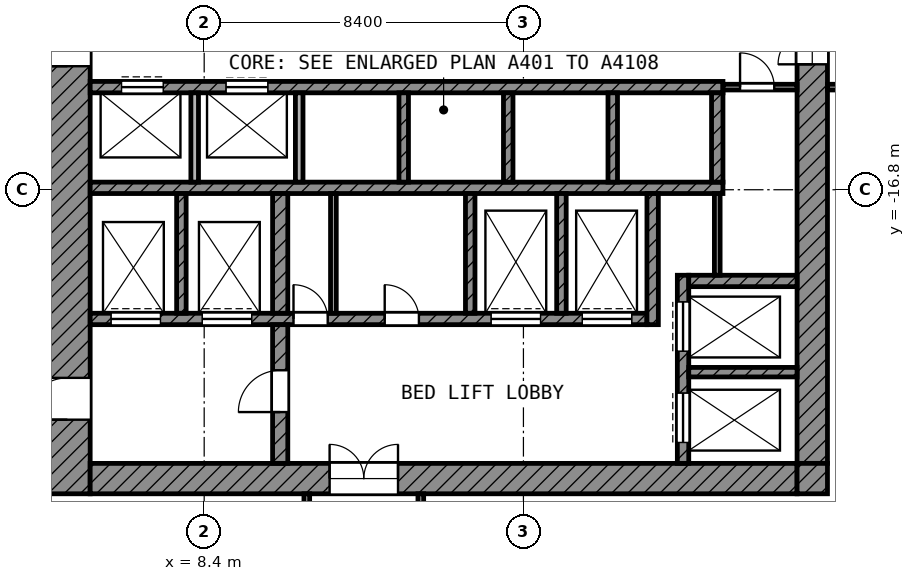
"""IFC4 building model, lengths in metres.
Left out: names, types, materials, properties, quantities, classifications, styles, units other than length and angle.
Written with IfcOpenShell. Run it as: python <this file> out.ifc"""

import sys

from ifc_helpers import new_model, si_unit, direction, frame, frame_2d, origin, place, context, subcontext, project, spatial, rectangle, extrude, element, fill, save


model = new_model("IFC4")
c1 = context("Model", 3, precision=1e-05, world=origin(), true_north=direction((0.0, 1.0)))
c2 = subcontext(c1, "Body", "Model", "MODEL_VIEW")
j1 = project(units=[si_unit("LENGTHUNIT", "METRE"), si_unit("PLANEANGLEUNIT", "RADIAN")], contexts=[c1])
p1 = place(None, origin())
s1 = spatial("IfcSite", under=j1, at=p1, CompositionType="ELEMENT")
p2 = place(p1, origin())
s2 = spatial("IfcBuilding", under=s1, at=p2, CompositionType="ELEMENT")
p3 = place(p2, frame((0.0, 0.0, 255.8)))
s3 = spatial("IfcBuildingStorey", under=s2, at=p3, CompositionType="ELEMENT", Elevation=255.8)
p4 = place(p3, frame((4.8, -24.8, 0.0), z_axis=(0.0, 0.0, 1.0), x_axis=(0.0, 1.0, 0.0)))
e1 = element("IfcWall", 1, at=p4, inside=s3, PredefinedType="SHEAR", context=c2, shape_type="SweptSolid", body=[
    extrude(rectangle(XDim=19.4, YDim=1.2, at=frame_2d((9.7, 0.0))), origin(), (0.0, 0.0, 1.0), 3.6),
])
p5 = place(p4, frame((11.25, 0.0, 0.0)))
e2 = element("IfcOpeningElement", 2, at=p5, cuts=e1, PredefinedType="OPENING", context=c2, shape_type="SweptSolid", body=[
    extrude(rectangle(XDim=1.1, YDim=2.1, at=frame_2d((0.55, 1.05))), frame((0.0, 0.61, 0.0), z_axis=(0.0, -1.0, 0.0), x_axis=(1.0, 0.0, 0.0)), (0.0, 0.0, 1.0), 1.22),
])
p6 = place(p4, frame((1.95, 0.0, 0.0)))
e3 = element("IfcOpeningElement", 3, at=p6, cuts=e1, PredefinedType="OPENING", context=c2, shape_type="SweptSolid", body=[
    extrude(rectangle(XDim=1.1, YDim=2.1, at=frame_2d((0.55, 1.05))), frame((0.0, 0.61, 0.0), z_axis=(0.0, -1.0, 0.0), x_axis=(1.0, 0.0, 0.0)), (0.0, 0.0, 1.0), 1.22),
])
p7 = place(p3, frame((24.4, -24.0, 0.0), z_axis=(0.0, 0.0, 1.0), x_axis=(0.0, 1.0, 0.0)))
e4 = element("IfcWall", 4, at=p7, inside=s3, PredefinedType="SHEAR", context=c2, shape_type="SweptSolid", body=[
    extrude(rectangle(XDim=18.6, YDim=0.8, at=frame_2d((9.3, 0.0))), origin(), (0.0, 0.0, 1.0), 3.6),
])
p8 = place(p7, frame((10.5, 0.0, 0.0)))
e5 = element("IfcOpeningElement", 5, at=p8, cuts=e4, PredefinedType="OPENING", context=c2, shape_type="SweptSolid", body=[
    extrude(rectangle(XDim=1.8, YDim=2.1, at=frame_2d((0.9, 1.05))), frame((0.0, 0.41, 0.0), z_axis=(0.0, -1.0, 0.0), x_axis=(1.0, 0.0, 0.0)), (0.0, 0.0, 1.0), 0.82),
])
p9 = place(p3, frame((5.4, -24.4, 0.0), z_axis=(0.0, 0.0, 1.0), x_axis=(1.0, 0.0, 0.0)))
e6 = element("IfcWall", 6, at=p9, inside=s3, PredefinedType="SHEAR", context=c2, shape_type="SweptSolid", body=[
    extrude(rectangle(XDim=18.6, YDim=0.8, at=frame_2d((9.3, 0.0))), origin(), (0.0, 0.0, 1.0), 3.6),
])
p10 = place(p9, frame((6.3, 0.0, 0.0)))
e7 = element("IfcOpeningElement", 7, at=p10, cuts=e6, PredefinedType="OPENING", context=c2, shape_type="SweptSolid", body=[
    extrude(rectangle(XDim=1.8, YDim=2.1, at=frame_2d((0.9, 1.05))), frame((0.0, 0.41, 0.0), z_axis=(0.0, -1.0, 0.0), x_axis=(1.0, 0.0, 0.0)), (0.0, 0.0, 1.0), 0.82),
])
p11 = place(p3, frame((24.4, -24.8, 0.0), z_axis=(0.0, 0.0, 1.0), x_axis=(0.0, 1.0, 0.0)))
e8 = element("IfcWall", 8, at=p11, inside=s3, PredefinedType="SHEAR", context=c2, shape_type="SweptSolid", body=[
    extrude(rectangle(XDim=0.8, YDim=0.8, at=frame_2d((0.4, 0.0))), origin(), (0.0, 0.0, 1.0), 3.6),
])
p12 = place(p3, frame((5.4, -14.1, 0.0), z_axis=(0.0, 0.0, 1.0), x_axis=(1.0, 0.0, 0.0)))
e9 = element("IfcWall", 9, at=p12, inside=s3, PredefinedType="SHEAR", context=c2, shape_type="SweptSolid", body=[
    extrude(rectangle(XDim=16.65, YDim=0.3, at=frame_2d((8.325, 0.0))), origin(), (0.0, 0.0, 1.0), 3.6),
])
p13 = place(p12, frame((0.825, 0.0, 0.0)))
e10 = element("IfcOpeningElement", 10, at=p13, cuts=e9, PredefinedType="OPENING", context=c2, shape_type="SweptSolid", body=[
    extrude(rectangle(XDim=1.1, YDim=2.1, at=frame_2d((0.55, 1.05))), frame((0.0, 0.16, 0.0), z_axis=(0.0, -1.0, 0.0), x_axis=(1.0, 0.0, 0.0)), (0.0, 0.0, 1.0), 0.32),
])
p14 = place(p12, frame((3.575, 0.0, 0.0)))
e11 = element("IfcOpeningElement", 11, at=p14, cuts=e9, PredefinedType="OPENING", context=c2, shape_type="SweptSolid", body=[
    extrude(rectangle(XDim=1.1, YDim=2.1, at=frame_2d((0.55, 1.05))), frame((0.0, 0.16, 0.0), z_axis=(0.0, -1.0, 0.0), x_axis=(1.0, 0.0, 0.0)), (0.0, 0.0, 1.0), 0.32),
])
p15 = place(p3, frame((5.4, -16.75, 0.0), z_axis=(0.0, 0.0, 1.0), x_axis=(1.0, 0.0, 0.0)))
e12 = element("IfcWall", 12, at=p15, inside=s3, PredefinedType="SHEAR", context=c2, shape_type="SweptSolid", body=[
    extrude(rectangle(XDim=16.65, YDim=0.3, at=frame_2d((8.325, 0.0))), origin(), (0.0, 0.0, 1.0), 3.6),
])
p16 = place(p3, frame((5.4, -20.2, 0.0), z_axis=(0.0, 0.0, 1.0), x_axis=(1.0, 0.0, 0.0)))
e13 = element("IfcWall", 13, at=p16, inside=s3, PredefinedType="SHEAR", context=c2, shape_type="SweptSolid", body=[
    extrude(rectangle(XDim=14.65, YDim=0.3, at=frame_2d((7.325, 0.0))), origin(), (0.0, 0.0, 1.0), 3.6),
])
p17 = place(p16, frame((10.55, 0.0, 0.0)))
e14 = element("IfcOpeningElement", 14, at=p17, cuts=e13, PredefinedType="OPENING", context=c2, shape_type="SweptSolid", body=[
    extrude(rectangle(XDim=1.3, YDim=2.1, at=frame_2d((0.65, 1.05))), frame((0.0, 0.16, 0.0), z_axis=(0.0, -1.0, 0.0), x_axis=(1.0, 0.0, 0.0)), (0.0, 0.0, 1.0), 0.32),
])
p18 = place(p16, frame((12.95, 0.0, 0.0)))
e15 = element("IfcOpeningElement", 15, at=p18, cuts=e13, PredefinedType="OPENING", context=c2, shape_type="SweptSolid", body=[
    extrude(rectangle(XDim=1.3, YDim=2.1, at=frame_2d((0.65, 1.05))), frame((0.0, 0.16, 0.0), z_axis=(0.0, -1.0, 0.0), x_axis=(1.0, 0.0, 0.0)), (0.0, 0.0, 1.0), 0.32),
])
p19 = place(p16, frame((0.55, 0.0, 0.0)))
e16 = element("IfcOpeningElement", 16, at=p19, cuts=e13, PredefinedType="OPENING", context=c2, shape_type="SweptSolid", body=[
    extrude(rectangle(XDim=1.3, YDim=2.1, at=frame_2d((0.65, 1.05))), frame((0.0, 0.16, 0.0), z_axis=(0.0, -1.0, 0.0), x_axis=(1.0, 0.0, 0.0)), (0.0, 0.0, 1.0), 0.32),
])
p20 = place(p16, frame((2.95, 0.0, 0.0)))
e17 = element("IfcOpeningElement", 17, at=p20, cuts=e13, PredefinedType="OPENING", context=c2, shape_type="SweptSolid", body=[
    extrude(rectangle(XDim=1.3, YDim=2.1, at=frame_2d((0.65, 1.05))), frame((0.0, 0.16, 0.0), z_axis=(0.0, -1.0, 0.0), x_axis=(1.0, 0.0, 0.0)), (0.0, 0.0, 1.0), 0.32),
])
p21 = place(p16, frame((5.35, 0.0, 0.0)))
e18 = element("IfcOpeningElement", 18, at=p21, cuts=e13, PredefinedType="OPENING", context=c2, shape_type="SweptSolid", body=[
    extrude(rectangle(XDim=0.9, YDim=2.1, at=frame_2d((0.45, 1.05))), frame((0.0, 0.16, 0.0), z_axis=(0.0, -1.0, 0.0), x_axis=(1.0, 0.0, 0.0)), (0.0, 0.0, 1.0), 0.32),
])
p22 = place(p16, frame((7.75, 0.0, 0.0)))
e19 = element("IfcOpeningElement", 19, at=p22, cuts=e13, PredefinedType="OPENING", context=c2, shape_type="SweptSolid", body=[
    extrude(rectangle(XDim=0.9, YDim=2.1, at=frame_2d((0.45, 1.05))), frame((0.0, 0.16, 0.0), z_axis=(0.0, -1.0, 0.0), x_axis=(1.0, 0.0, 0.0)), (0.0, 0.0, 1.0), 0.32),
])
p23 = place(p3, frame((10.4, -24.0, 0.0), z_axis=(0.0, 0.0, 1.0), x_axis=(0.0, 1.0, 0.0)))
e20 = element("IfcWall", 20, at=p23, inside=s3, PredefinedType="SHEAR", context=c2, shape_type="SweptSolid", body=[
    extrude(rectangle(XDim=3.65, YDim=0.4, at=frame_2d((1.825, 0.0))), origin(), (0.0, 0.0, 1.0), 3.6),
])
p24 = place(p23, frame((1.35, 0.0, 0.0)))
e21 = element("IfcOpeningElement", 21, at=p24, cuts=e20, PredefinedType="OPENING", context=c2, shape_type="SweptSolid", body=[
    extrude(rectangle(XDim=1.1, YDim=2.1, at=frame_2d((0.55, 1.05))), frame((0.0, 0.21, 0.0), z_axis=(0.0, -1.0, 0.0), x_axis=(1.0, 0.0, 0.0)), (0.0, 0.0, 1.0), 0.42),
])
p25 = place(p3, frame((10.4, -20.05, 0.0), z_axis=(0.0, 0.0, 1.0), x_axis=(0.0, 1.0, 0.0)))
e22 = element("IfcWall", 22, at=p25, inside=s3, PredefinedType="SHEAR", context=c2, shape_type="SweptSolid", body=[
    extrude(rectangle(XDim=3.15, YDim=0.4, at=frame_2d((1.575, 0.0))), origin(), (0.0, 0.0, 1.0), 3.6),
])
p26 = place(p3, frame((20.2, -20.35, 0.0), z_axis=(0.0, 0.0, 1.0), x_axis=(0.0, 1.0, 0.0)))
e23 = element("IfcWall", 23, at=p26, inside=s3, PredefinedType="SHEAR", context=c2, shape_type="SweptSolid", body=[
    extrude(rectangle(XDim=3.45, YDim=0.3, at=frame_2d((1.725, 0.0))), origin(), (0.0, 0.0, 1.0), 3.6),
])
p27 = place(p3, frame((21.9, -16.6, 0.0), z_axis=(0.0, 0.0, 1.0), x_axis=(0.0, 1.0, 0.0)))
e24 = element("IfcWall", 24, at=p27, inside=s3, PredefinedType="SHEAR", context=c2, shape_type="SweptSolid", body=[
    extrude(rectangle(XDim=2.35, YDim=0.3, at=frame_2d((1.175, 0.0))), origin(), (0.0, 0.0, 1.0), 3.6),
])
p28 = place(p3, frame((21.15, -19.2, 0.0), z_axis=(0.0, 0.0, 1.0), x_axis=(1.0, 0.0, 0.0)))
e25 = element("IfcWall", 25, at=p28, inside=s3, PredefinedType="SHEAR", context=c2, shape_type="SweptSolid", body=[
    extrude(rectangle(XDim=2.85, YDim=0.3, at=frame_2d((1.425, 0.0))), origin(), (0.0, 0.0, 1.0), 3.6),
])
p29 = place(p3, frame((21.0, -24.0, 0.0), z_axis=(0.0, 0.0, 1.0), x_axis=(0.0, 1.0, 0.0)))
e26 = element("IfcWall", 26, at=p29, inside=s3, PredefinedType="SHEAR", context=c2, shape_type="SweptSolid", body=[
    extrude(rectangle(XDim=4.95, YDim=0.3, at=frame_2d((2.475, 0.0))), origin(), (0.0, 0.0, 1.0), 3.6),
])
p30 = place(p29, frame((2.95, 0.0, 0.0)))
e27 = element("IfcOpeningElement", 27, at=p30, cuts=e26, PredefinedType="OPENING", context=c2, shape_type="SweptSolid", body=[
    extrude(rectangle(XDim=1.3, YDim=2.1, at=frame_2d((0.65, 1.05))), frame((0.0, 0.16, 0.0), z_axis=(0.0, -1.0, 0.0), x_axis=(1.0, 0.0, 0.0)), (0.0, 0.0, 1.0), 0.32),
])
p31 = place(p29, frame((0.55, 0.0, 0.0)))
e28 = element("IfcOpeningElement", 28, at=p31, cuts=e26, PredefinedType="OPENING", context=c2, shape_type="SweptSolid", body=[
    extrude(rectangle(XDim=1.3, YDim=2.1, at=frame_2d((0.65, 1.05))), frame((0.0, 0.16, 0.0), z_axis=(0.0, -1.0, 0.0), x_axis=(1.0, 0.0, 0.0)), (0.0, 0.0, 1.0), 0.32),
])
p32 = place(p3, frame((21.15, -21.6, 0.0), z_axis=(0.0, 0.0, 1.0), x_axis=(1.0, 0.0, 0.0)))
e29 = element("IfcWall", 29, at=p32, inside=s3, PredefinedType="SHEAR", context=c2, shape_type="SweptSolid", body=[
    extrude(rectangle(XDim=2.85, YDim=0.25, at=frame_2d((1.425, 0.0))), origin(), (0.0, 0.0, 1.0), 3.6),
])
for number, where, z_axis, x_axis in (
    (30, (7.8, -20.05, 0.0), (0.0, 0.0, 1.0), (0.0, 1.0, 0.0)),
    (31, (15.4, -20.05, 0.0), (0.0, 0.0, 1.0), (0.0, 1.0, 0.0)),
    (32, (17.8, -20.05, 0.0), (0.0, 0.0, 1.0), (0.0, 1.0, 0.0)),
):
    element("IfcWall", number, at=place(p3, frame(where, z_axis=z_axis, x_axis=x_axis)), inside=s3, PredefinedType="SHEAR", context=c2, shape_type="SweptSolid", body=[
        extrude(rectangle(XDim=3.15, YDim=0.25, at=frame_2d((1.575, 0.0))), origin(), (0.0, 0.0, 1.0), 3.6),
    ])
for number, where, z_axis, x_axis in (
    (33, (8.15, -16.6, 0.0), (0.0, 0.0, 1.0), (0.0, 1.0, 0.0)),
    (34, (10.9, -16.6, 0.0), (0.0, 0.0, 1.0), (0.0, 1.0, 0.0)),
):
    element("IfcWall", number, at=place(p3, frame(where, z_axis=z_axis, x_axis=x_axis)), inside=s3, PredefinedType="PARTITIONING", context=c2, shape_type="SweptSolid", body=[
        extrude(rectangle(XDim=2.35, YDim=0.2, at=frame_2d((1.175, 0.0))), origin(), (0.0, 0.0, 1.0), 3.6),
    ])
for number, where, z_axis, x_axis in (
    (35, (13.65, -16.6, 0.0), (0.0, 0.0, 1.0), (0.0, 1.0, 0.0)),
    (36, (16.4, -16.6, 0.0), (0.0, 0.0, 1.0), (0.0, 1.0, 0.0)),
    (37, (19.15, -16.6, 0.0), (0.0, 0.0, 1.0), (0.0, 1.0, 0.0)),
):
    element("IfcWall", number, at=place(p3, frame(where, z_axis=z_axis, x_axis=x_axis)), inside=s3, PredefinedType="SHEAR", context=c2, shape_type="SweptSolid", body=[
        extrude(rectangle(XDim=2.35, YDim=0.25, at=frame_2d((1.175, 0.0))), origin(), (0.0, 0.0, 1.0), 3.6),
    ])
p33 = place(p3, frame((21.9, -19.05, 0.0), z_axis=(0.0, 0.0, 1.0), x_axis=(0.0, 1.0, 0.0)))
e38 = element("IfcWall", 38, at=p33, inside=s3, PredefinedType="PARTITIONING", context=c2, shape_type="SweptSolid", body=[
    extrude(rectangle(XDim=2.15, YDim=0.15, at=frame_2d((1.075, 0.0))), origin(), (0.0, 0.0, 1.0), 3.6),
])
p34 = place(p3, frame((22.05, -14.1, 0.0), z_axis=(0.0, 0.0, 1.0), x_axis=(1.0, 0.0, 0.0)))
e39 = element("IfcWall", 39, at=p34, inside=s3, PredefinedType="PARTITIONING", context=c2, shape_type="SweptSolid", body=[
    extrude(rectangle(XDim=1.95, YDim=0.15, at=frame_2d((0.975, 0.0))), origin(), (0.0, 0.0, 1.0), 3.6),
])
p35 = place(p34, frame((0.45, 0.0, 0.0)))
e40 = element("IfcOpeningElement", 40, at=p35, cuts=e39, PredefinedType="OPENING", context=c2, shape_type="SweptSolid", body=[
    extrude(rectangle(XDim=0.9, YDim=2.1, at=frame_2d((0.45, 1.05))), frame((0.0, 0.085, 0.0), z_axis=(0.0, -1.0, 0.0), x_axis=(1.0, 0.0, 0.0)), (0.0, 0.0, 1.0), 0.17),
])
p36 = place(p3, frame((11.8, -20.05, 0.0), z_axis=(0.0, 0.0, 1.0), x_axis=(0.0, 1.0, 0.0)))
e41 = element("IfcWall", 41, at=p36, inside=s3, PredefinedType="PARTITIONING", context=c2, shape_type="SweptSolid", body=[
    extrude(rectangle(XDim=3.15, YDim=0.15, at=frame_2d((1.575, 0.0))), origin(), (0.0, 0.0, 1.0), 3.6),
])
p37 = place(p3, frame((24.8, -14.1, 0.0), z_axis=(0.0, 0.0, 1.0), x_axis=(1.0, 0.0, 0.0)))
e42 = element("IfcWall", 42, at=p37, inside=s3, PredefinedType="PARTITIONING", context=c2, shape_type="SweptSolid", body=[
    extrude(rectangle(XDim=4.525, YDim=0.15, at=frame_2d((2.262, 0.0))), origin(), (0.0, 0.0, 1.0), 3.6),
])
p38 = place(p37, frame((1.75, 0.0, 0.0)))
e43 = element("IfcOpeningElement", 43, at=p38, cuts=e42, PredefinedType="OPENING", context=c2, shape_type="SweptSolid", body=[
    extrude(rectangle(XDim=1.5, YDim=2.1, at=frame_2d((0.75, 1.05))), frame((0.0, 0.085, 0.0), z_axis=(0.0, -1.0, 0.0), x_axis=(1.0, 0.0, 0.0)), (0.0, 0.0, 1.0), 0.17),
])
p39 = place(p3, frame((11.1, -29.4, 0.0), z_axis=(0.0, 0.0, 1.0), x_axis=(0.0, 1.0, 0.0)))
e44 = element("IfcWall", 44, at=p39, inside=s3, PredefinedType="PARTITIONING", context=c2, shape_type="SweptSolid", body=[
    extrude(rectangle(XDim=4.6, YDim=0.15, at=frame_2d((2.3, 0.0))), origin(), (0.0, 0.0, 1.0), 3.6),
])
p40 = place(p39, frame((1.6, 0.0, 0.0)))
e45 = element("IfcOpeningElement", 45, at=p40, cuts=e44, PredefinedType="OPENING", context=c2, shape_type="SweptSolid", body=[
    extrude(rectangle(XDim=1.0, YDim=2.1, at=frame_2d((0.5, 1.05))), frame((0.0, 0.085, 0.0), z_axis=(0.0, -1.0, 0.0), x_axis=(1.0, 0.0, 0.0)), (0.0, 0.0, 1.0), 0.17),
])
p41 = place(p3, frame((14.1, -29.4, 0.0), z_axis=(0.0, 0.0, 1.0), x_axis=(0.0, 1.0, 0.0)))
e46 = element("IfcWall", 46, at=p41, inside=s3, PredefinedType="PARTITIONING", context=c2, shape_type="SweptSolid", body=[
    extrude(rectangle(XDim=4.6, YDim=0.15, at=frame_2d((2.3, 0.0))), origin(), (0.0, 0.0, 1.0), 3.6),
])
p42 = place(p13, origin())
e47 = element("IfcDoor", 47, at=p42, inside=s3, OperationType="DOUBLE_DOOR_SLIDING", PredefinedType="DOOR", context=c2, shape_type="SweptSolid", body=[
    extrude(rectangle(XDim=1.1, YDim=2.1, at=frame_2d((0.55, 1.05))), frame((0.0, 0.025, 0.0), z_axis=(0.0, -1.0, 0.0), x_axis=(1.0, 0.0, 0.0)), (0.0, 0.0, 1.0), 0.05),
])
fill(e10, e47)
p43 = place(p14, origin())
e48 = element("IfcDoor", 48, at=p43, inside=s3, OperationType="DOUBLE_DOOR_SLIDING", PredefinedType="DOOR", context=c2, shape_type="SweptSolid", body=[
    extrude(rectangle(XDim=1.1, YDim=2.1, at=frame_2d((0.55, 1.05))), frame((0.0, 0.025, 0.0), z_axis=(0.0, -1.0, 0.0), x_axis=(1.0, 0.0, 0.0)), (0.0, 0.0, 1.0), 0.05),
])
fill(e11, e48)
p44 = place(p30, origin())
e49 = element("IfcDoor", 49, at=p44, inside=s3, OperationType="DOUBLE_DOOR_SLIDING", PredefinedType="DOOR", context=c2, shape_type="SweptSolid", body=[
    extrude(rectangle(XDim=1.3, YDim=2.1, at=frame_2d((0.65, 1.05))), frame((0.0, 0.025, 0.0), z_axis=(0.0, -1.0, 0.0), x_axis=(1.0, 0.0, 0.0)), (0.0, 0.0, 1.0), 0.05),
])
fill(e27, e49)
p45 = place(p31, origin())
e50 = element("IfcDoor", 50, at=p45, inside=s3, OperationType="DOUBLE_DOOR_SLIDING", PredefinedType="DOOR", context=c2, shape_type="SweptSolid", body=[
    extrude(rectangle(XDim=1.3, YDim=2.1, at=frame_2d((0.65, 1.05))), frame((0.0, 0.025, 0.0), z_axis=(0.0, -1.0, 0.0), x_axis=(1.0, 0.0, 0.0)), (0.0, 0.0, 1.0), 0.05),
])
fill(e28, e50)
p46 = place(p17, origin())
e51 = element("IfcDoor", 51, at=p46, inside=s3, OperationType="DOUBLE_DOOR_SLIDING", PredefinedType="DOOR", context=c2, shape_type="SweptSolid", body=[
    extrude(rectangle(XDim=1.3, YDim=2.1, at=frame_2d((0.65, 1.05))), frame((0.0, 0.025, 0.0), z_axis=(0.0, -1.0, 0.0), x_axis=(1.0, 0.0, 0.0)), (0.0, 0.0, 1.0), 0.05),
])
fill(e14, e51)
p47 = place(p18, origin())
e52 = element("IfcDoor", 52, at=p47, inside=s3, OperationType="DOUBLE_DOOR_SLIDING", PredefinedType="DOOR", context=c2, shape_type="SweptSolid", body=[
    extrude(rectangle(XDim=1.3, YDim=2.1, at=frame_2d((0.65, 1.05))), frame((0.0, 0.025, 0.0), z_axis=(0.0, -1.0, 0.0), x_axis=(1.0, 0.0, 0.0)), (0.0, 0.0, 1.0), 0.05),
])
fill(e15, e52)
p48 = place(p19, origin())
e53 = element("IfcDoor", 53, at=p48, inside=s3, OperationType="DOUBLE_DOOR_SLIDING", PredefinedType="DOOR", context=c2, shape_type="SweptSolid", body=[
    extrude(rectangle(XDim=1.3, YDim=2.1, at=frame_2d((0.65, 1.05))), frame((0.0, 0.025, 0.0), z_axis=(0.0, -1.0, 0.0), x_axis=(1.0, 0.0, 0.0)), (0.0, 0.0, 1.0), 0.05),
])
fill(e16, e53)
p49 = place(p20, origin())
e54 = element("IfcDoor", 54, at=p49, inside=s3, OperationType="DOUBLE_DOOR_SLIDING", PredefinedType="DOOR", context=c2, shape_type="SweptSolid", body=[
    extrude(rectangle(XDim=1.3, YDim=2.1, at=frame_2d((0.65, 1.05))), frame((0.0, 0.025, 0.0), z_axis=(0.0, -1.0, 0.0), x_axis=(1.0, 0.0, 0.0)), (0.0, 0.0, 1.0), 0.05),
])
fill(e17, e54)
p50 = place(p5, origin())
e55 = element("IfcDoor", 55, at=p50, inside=s3, OperationType="SINGLE_SWING_LEFT", PredefinedType="DOOR", context=c2, shape_type="SweptSolid", body=[
    extrude(rectangle(XDim=1.1, YDim=2.1, at=frame_2d((0.55, 1.05))), frame((0.0, 0.025, 0.0), z_axis=(0.0, -1.0, 0.0), x_axis=(1.0, 0.0, 0.0)), (0.0, 0.0, 1.0), 0.05),
])
fill(e2, e55)
p51 = place(p6, origin())
e56 = element("IfcDoor", 56, at=p51, inside=s3, OperationType="SINGLE_SWING_LEFT", PredefinedType="DOOR", context=c2, shape_type="SweptSolid", body=[
    extrude(rectangle(XDim=1.1, YDim=2.1, at=frame_2d((0.55, 1.05))), frame((0.0, 0.025, 0.0), z_axis=(0.0, -1.0, 0.0), x_axis=(1.0, 0.0, 0.0)), (0.0, 0.0, 1.0), 0.05),
])
fill(e3, e56)
p52 = place(p24, origin())
e57 = element("IfcDoor", 57, at=p52, inside=s3, OperationType="SINGLE_SWING_LEFT", PredefinedType="DOOR", context=c2, shape_type="SweptSolid", body=[
    extrude(rectangle(XDim=1.1, YDim=2.1, at=frame_2d((0.55, 1.05))), frame((0.0, 0.025, 0.0), z_axis=(0.0, -1.0, 0.0), x_axis=(1.0, 0.0, 0.0)), (0.0, 0.0, 1.0), 0.05),
])
fill(e21, e57)
p53 = place(p8, origin())
e58 = element("IfcDoor", 58, at=p53, inside=s3, OperationType="DOUBLE_DOOR_SINGLE_SWING", PredefinedType="DOOR", context=c2, shape_type="SweptSolid", body=[
    extrude(rectangle(XDim=1.8, YDim=2.1, at=frame_2d((0.9, 1.05))), frame((0.0, 0.025, 0.0), z_axis=(0.0, -1.0, 0.0), x_axis=(1.0, 0.0, 0.0)), (0.0, 0.0, 1.0), 0.05),
])
fill(e5, e58)
p54 = place(p10, origin())
e59 = element("IfcDoor", 59, at=p54, inside=s3, OperationType="DOUBLE_DOOR_SINGLE_SWING", PredefinedType="DOOR", context=c2, shape_type="SweptSolid", body=[
    extrude(rectangle(XDim=1.8, YDim=2.1, at=frame_2d((0.9, 1.05))), frame((0.0, 0.025, 0.0), z_axis=(0.0, -1.0, 0.0), x_axis=(1.0, 0.0, 0.0)), (0.0, 0.0, 1.0), 0.05),
])
fill(e7, e59)
p55 = place(p35, origin())
e60 = element("IfcDoor", 60, at=p55, inside=s3, OperationType="SINGLE_SWING_LEFT", PredefinedType="DOOR", context=c2, shape_type="SweptSolid", body=[
    extrude(rectangle(XDim=0.9, YDim=2.1, at=frame_2d((0.45, 1.05))), frame((0.0, 0.025, 0.0), z_axis=(0.0, -1.0, 0.0), x_axis=(1.0, 0.0, 0.0)), (0.0, 0.0, 1.0), 0.05),
])
fill(e40, e60)
p56 = place(p21, origin())
e61 = element("IfcDoor", 61, at=p56, inside=s3, OperationType="SINGLE_SWING_LEFT", PredefinedType="DOOR", context=c2, shape_type="SweptSolid", body=[
    extrude(rectangle(XDim=0.9, YDim=2.1, at=frame_2d((0.45, 1.05))), frame((0.0, 0.025, 0.0), z_axis=(0.0, -1.0, 0.0), x_axis=(1.0, 0.0, 0.0)), (0.0, 0.0, 1.0), 0.05),
])
fill(e18, e61)
p57 = place(p22, origin())
e62 = element("IfcDoor", 62, at=p57, inside=s3, OperationType="SINGLE_SWING_LEFT", PredefinedType="DOOR", context=c2, shape_type="SweptSolid", body=[
    extrude(rectangle(XDim=0.9, YDim=2.1, at=frame_2d((0.45, 1.05))), frame((0.0, 0.025, 0.0), z_axis=(0.0, -1.0, 0.0), x_axis=(1.0, 0.0, 0.0)), (0.0, 0.0, 1.0), 0.05),
])
fill(e19, e62)
save(model, sys.argv[1])
